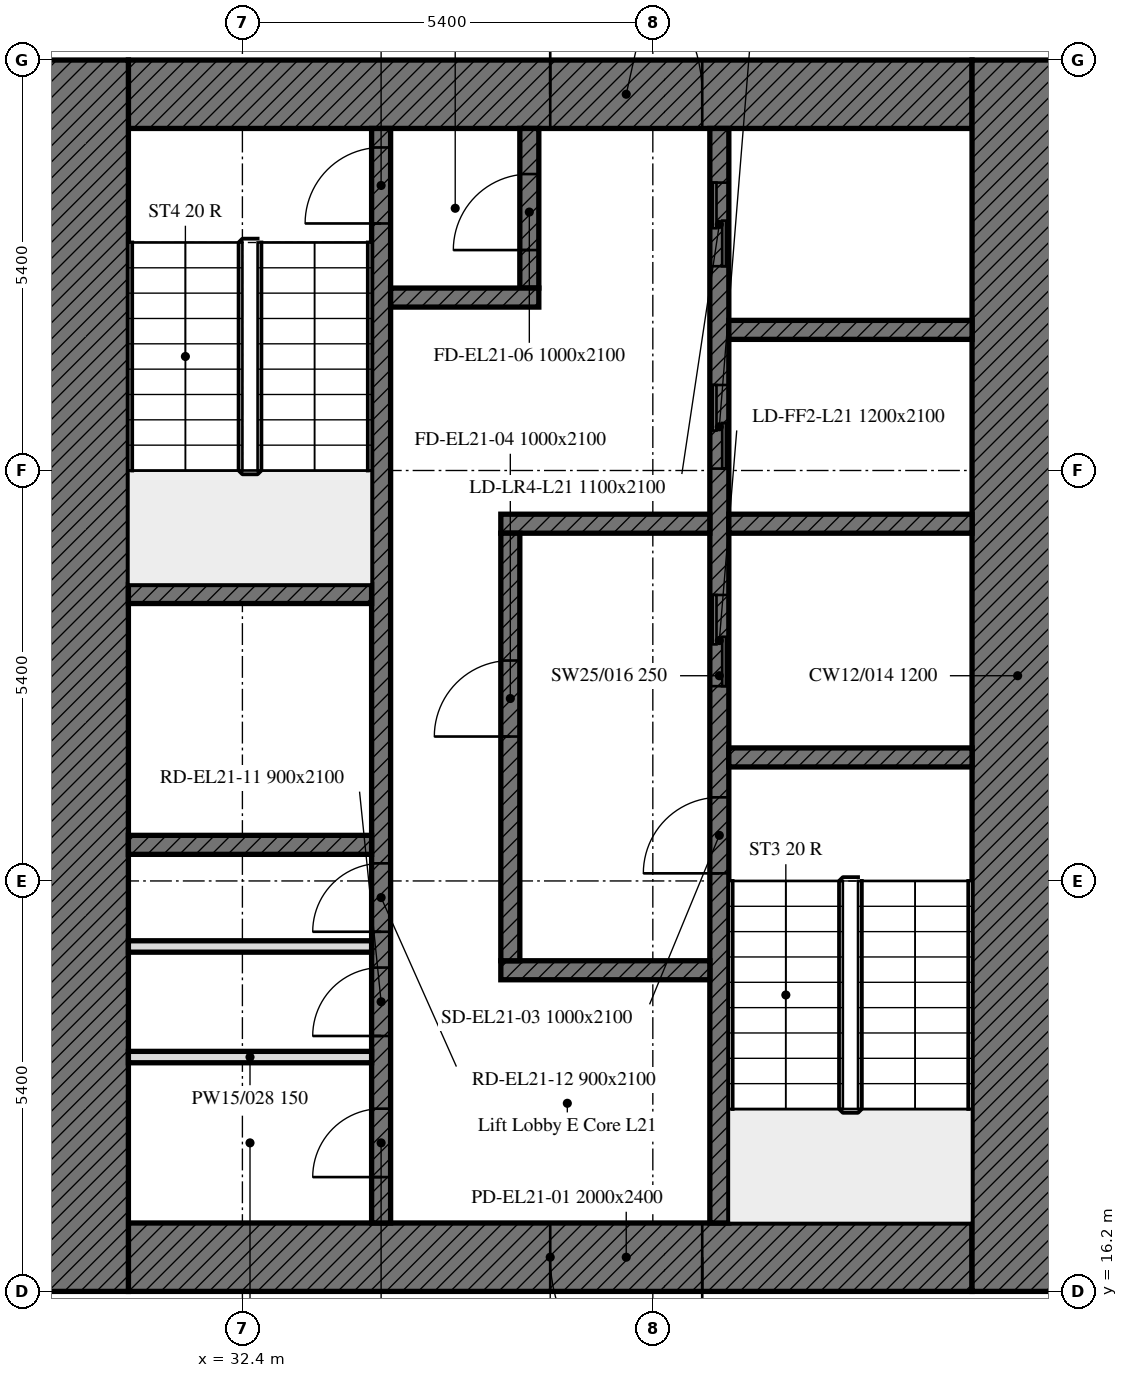
"""IFC4 building model, lengths in metres.
Left out: names, types, materials, properties, quantities, classifications, styles, units other than length and angle.
Written with IfcOpenShell. Run it as: python <this file> out.ifc"""

import sys

from ifc_helpers import new_model, si_unit, direction, frame, frame_2d, origin, place, context, subcontext, project, spatial, rectangle, extrude, element, fill, save


model = new_model("IFC4")
c1 = context("Model", 3, precision=1e-05, world=origin(), true_north=direction((0.0, 1.0)))
c2 = subcontext(c1, "Body", "Model", "MODEL_VIEW")
j1 = project(units=[si_unit("LENGTHUNIT", "METRE"), si_unit("PLANEANGLEUNIT", "RADIAN")], contexts=[c1])
p1 = place(None, origin())
s1 = spatial("IfcSite", under=j1, at=p1, CompositionType="ELEMENT")
p2 = place(p1, origin())
s2 = spatial("IfcBuilding", under=s1, at=p2, CompositionType="ELEMENT")
p3 = place(p2, frame((0.0, 0.0, 91.6)))
s3 = spatial("IfcBuildingStorey", under=s2, at=p3, CompositionType="ELEMENT", Elevation=91.6)
p4 = place(p3, frame((42.0, 16.65, 0.0), z_axis=(0.0, 0.0, 1.0), x_axis=(-1.0, 0.0, 0.0)))
e1 = element("IfcWall", 1, at=p4, inside=s3, PredefinedType="SOLIDWALL", context=c2, shape_type="SweptSolid", body=[
    extrude(rectangle(XDim=11.1, YDim=0.9, at=frame_2d((5.55, 0.0))), origin(), (0.0, 0.0, 1.0), 3.5),
])
p5 = place(p4, frame((3.55, 0.0, 0.0)))
e2 = element("IfcOpeningElement", 2, at=p5, cuts=e1, PredefinedType="OPENING", context=c2, shape_type="SweptSolid", body=[
    extrude(rectangle(XDim=2.0, YDim=2.4, at=frame_2d((1.0, 1.2))), frame((0.0, 0.45, 0.0), z_axis=(0.0, -1.0, 0.0), x_axis=(1.0, 0.0, 0.0)), (0.0, 0.0, 1.0), 0.9),
])
p6 = place(p3, frame((30.9, 31.95, 0.0), z_axis=(0.0, 0.0, 1.0), x_axis=(1.0, 0.0, 0.0)))
e3 = element("IfcWall", 3, at=p6, inside=s3, PredefinedType="SOLIDWALL", context=c2, shape_type="SweptSolid", body=[
    extrude(rectangle(XDim=11.1, YDim=0.9, at=frame_2d((5.55, 0.0))), origin(), (0.0, 0.0, 1.0), 3.5),
])
p7 = place(p6, frame((5.55, 0.0, 0.0)))
e4 = element("IfcOpeningElement", 4, at=p7, cuts=e3, PredefinedType="OPENING", context=c2, shape_type="SweptSolid", body=[
    extrude(rectangle(XDim=2.0, YDim=2.4, at=frame_2d((1.0, 1.2))), frame((0.0, 0.45, 0.0), z_axis=(0.0, -1.0, 0.0), x_axis=(1.0, 0.0, 0.0)), (0.0, 0.0, 1.0), 0.9),
])
for number, where, z_axis, x_axis in (
    (5, (42.6, 32.4, 0.0), (0.0, 0.0, 1.0), (0.0, -1.0, 0.0)),
    (6, (30.3, 16.2, 0.0), (0.0, 0.0, 1.0), (0.0, 1.0, 0.0)),
):
    element("IfcWall", number, at=place(p3, frame(where, z_axis=z_axis, x_axis=x_axis)), inside=s3, PredefinedType="SOLIDWALL", context=c2, shape_type="SweptSolid", body=[
        extrude(rectangle(XDim=16.2, YDim=1.2, at=frame_2d((8.1, 0.0))), origin(), (0.0, 0.0, 1.0), 3.5),
    ])
p8 = place(p3, frame((38.675, 17.1, 0.0), z_axis=(0.0, 0.0, 1.0), x_axis=(0.0, 1.0, 0.0)))
e7 = element("IfcWall", 7, at=p8, inside=s3, PredefinedType="SOLIDWALL", context=c2, shape_type="SweptSolid", body=[
    extrude(rectangle(XDim=14.4, YDim=0.25, at=frame_2d((7.2, 0.0))), origin(), (0.0, 0.0, 1.0), 3.5),
])
p9 = place(p8, frame((4.6, 0.0, 0.0)))
e8 = element("IfcOpeningElement", 8, at=p9, cuts=e7, PredefinedType="OPENING", context=c2, shape_type="SweptSolid", body=[
    extrude(rectangle(XDim=1.0, YDim=2.1, at=frame_2d((0.5, 1.05))), frame((0.0, 0.125, 0.0), z_axis=(0.0, -1.0, 0.0), x_axis=(1.0, 0.0, 0.0)), (0.0, 0.0, 1.0), 0.25),
])
p10 = place(p8, frame((7.062, 0.0, 0.0)))
e9 = element("IfcOpeningElement", 9, at=p10, cuts=e7, PredefinedType="OPENING", context=c2, shape_type="SweptSolid", body=[
    extrude(rectangle(XDim=1.2, YDim=2.1, at=frame_2d((0.6, 1.05))), frame((0.0, 0.125, 0.0), z_axis=(0.0, -1.0, 0.0), x_axis=(1.0, 0.0, 0.0)), (0.0, 0.0, 1.0), 0.25),
])
p11 = place(p8, frame((9.925, 0.0, 0.0)))
e10 = element("IfcOpeningElement", 10, at=p11, cuts=e7, PredefinedType="OPENING", context=c2, shape_type="SweptSolid", body=[
    extrude(rectangle(XDim=1.1, YDim=2.1, at=frame_2d((0.55, 1.05))), frame((0.0, 0.125, 0.0), z_axis=(0.0, -1.0, 0.0), x_axis=(1.0, 0.0, 0.0)), (0.0, 0.0, 1.0), 0.25),
])
p12 = place(p8, frame((12.587, 0.0, 0.0)))
e11 = element("IfcOpeningElement", 11, at=p12, cuts=e7, PredefinedType="OPENING", context=c2, shape_type="SweptSolid", body=[
    extrude(rectangle(XDim=1.1, YDim=2.1, at=frame_2d((0.55, 1.05))), frame((0.0, 0.125, 0.0), z_axis=(0.0, -1.0, 0.0), x_axis=(1.0, 0.0, 0.0)), (0.0, 0.0, 1.0), 0.25),
])
p13 = place(p3, frame((34.225, 17.1, 0.0), z_axis=(0.0, 0.0, 1.0), x_axis=(0.0, 1.0, 0.0)))
e12 = element("IfcWall", 12, at=p13, inside=s3, PredefinedType="SOLIDWALL", context=c2, shape_type="SweptSolid", body=[
    extrude(rectangle(XDim=14.4, YDim=0.25, at=frame_2d((7.2, 0.0))), origin(), (0.0, 0.0, 1.0), 3.5),
])
p14 = place(p13, frame((13.15, 0.0, 0.0)))
e13 = element("IfcOpeningElement", 13, at=p14, cuts=e12, PredefinedType="OPENING", context=c2, shape_type="SweptSolid", body=[
    extrude(rectangle(XDim=1.0, YDim=2.1, at=frame_2d((0.5, 1.05))), frame((0.0, 0.125, 0.0), z_axis=(0.0, -1.0, 0.0), x_axis=(1.0, 0.0, 0.0)), (0.0, 0.0, 1.0), 0.25),
])
p15 = place(p13, frame((0.604, 0.0, 0.0)))
e14 = element("IfcOpeningElement", 14, at=p15, cuts=e12, PredefinedType="OPENING", context=c2, shape_type="SweptSolid", body=[
    extrude(rectangle(XDim=0.9, YDim=2.1, at=frame_2d((0.45, 1.05))), frame((0.0, 0.125, 0.0), z_axis=(0.0, -1.0, 0.0), x_axis=(1.0, 0.0, 0.0)), (0.0, 0.0, 1.0), 0.25),
])
p16 = place(p13, frame((2.46, 0.0, 0.0)))
e15 = element("IfcOpeningElement", 15, at=p16, cuts=e12, PredefinedType="OPENING", context=c2, shape_type="SweptSolid", body=[
    extrude(rectangle(XDim=0.9, YDim=2.1, at=frame_2d((0.45, 1.05))), frame((0.0, 0.125, 0.0), z_axis=(0.0, -1.0, 0.0), x_axis=(1.0, 0.0, 0.0)), (0.0, 0.0, 1.0), 0.25),
])
p17 = place(p13, frame((3.832, 0.0, 0.0)))
e16 = element("IfcOpeningElement", 16, at=p17, cuts=e12, PredefinedType="OPENING", context=c2, shape_type="SweptSolid", body=[
    extrude(rectangle(XDim=0.9, YDim=2.1, at=frame_2d((0.45, 1.05))), frame((0.0, 0.125, 0.0), z_axis=(0.0, -1.0, 0.0), x_axis=(1.0, 0.0, 0.0)), (0.0, 0.0, 1.0), 0.25),
])
p18 = place(p3, frame((38.8, 23.225, 0.0), z_axis=(0.0, 0.0, 1.0), x_axis=(1.0, 0.0, 0.0)))
e17 = element("IfcWall", 17, at=p18, inside=s3, PredefinedType="SOLIDWALL", context=c2, shape_type="SweptSolid", body=[
    extrude(rectangle(XDim=3.2, YDim=0.25, at=frame_2d((1.6, 0.0))), origin(), (0.0, 0.0, 1.0), 3.5),
])
for number, where, z_axis, x_axis in (
    (18, (30.9, 25.375, 0.0), (0.0, 0.0, 1.0), (1.0, 0.0, 0.0)),
    (19, (30.9, 22.075, 0.0), (0.0, 0.0, 1.0), (1.0, 0.0, 0.0)),
):
    element("IfcWall", number, at=place(p3, frame(where, z_axis=z_axis, x_axis=x_axis)), inside=s3, PredefinedType="SOLIDWALL", context=c2, shape_type="SweptSolid", body=[
        extrude(rectangle(XDim=3.2, YDim=0.25, at=frame_2d((1.6, 0.0))), origin(), (0.0, 0.0, 1.0), 3.5),
    ])
p19 = place(p3, frame((38.8, 26.3, 0.0), z_axis=(0.0, 0.0, 1.0), x_axis=(1.0, 0.0, 0.0)))
e20 = element("IfcWall", 20, at=p19, inside=s3, PredefinedType="SOLIDWALL", context=c2, shape_type="SweptSolid", body=[
    extrude(rectangle(XDim=3.2, YDim=0.25, at=frame_2d((1.6, 0.0))), origin(), (0.0, 0.0, 1.0), 3.5),
])
for number, where, z_axis, x_axis in (
    (21, (35.8, 26.3, 0.0), (0.0, 0.0, 1.0), (1.0, 0.0, 0.0)),
    (22, (35.8, 20.425, 0.0), (0.0, 0.0, 1.0), (1.0, 0.0, 0.0)),
):
    element("IfcWall", number, at=place(p3, frame(where, z_axis=z_axis, x_axis=x_axis)), inside=s3, PredefinedType="SOLIDWALL", context=c2, shape_type="SweptSolid", body=[
        extrude(rectangle(XDim=2.75, YDim=0.25, at=frame_2d((1.375, 0.0))), origin(), (0.0, 0.0, 1.0), 3.5),
    ])
p20 = place(p3, frame((36.175, 29.4, 0.0), z_axis=(0.0, 0.0, 1.0), x_axis=(0.0, 1.0, 0.0)))
e23 = element("IfcWall", 23, at=p20, inside=s3, PredefinedType="SOLIDWALL", context=c2, shape_type="SweptSolid", body=[
    extrude(rectangle(XDim=2.1, YDim=0.25, at=frame_2d((1.05, 0.0))), origin(), (0.0, 0.0, 1.0), 3.5),
])
p21 = place(p20, frame((0.5, 0.0, 0.0)))
e24 = element("IfcOpeningElement", 24, at=p21, cuts=e23, PredefinedType="OPENING", context=c2, shape_type="SweptSolid", body=[
    extrude(rectangle(XDim=1.0, YDim=2.1, at=frame_2d((0.5, 1.05))), frame((0.0, 0.125, 0.0), z_axis=(0.0, -1.0, 0.0), x_axis=(1.0, 0.0, 0.0)), (0.0, 0.0, 1.0), 0.25),
])
p22 = place(p3, frame((34.35, 29.275, 0.0), z_axis=(0.0, 0.0, 1.0), x_axis=(1.0, 0.0, 0.0)))
e25 = element("IfcWall", 25, at=p22, inside=s3, PredefinedType="SOLIDWALL", context=c2, shape_type="SweptSolid", body=[
    extrude(rectangle(XDim=1.95, YDim=0.25, at=frame_2d((0.975, 0.0))), origin(), (0.0, 0.0, 1.0), 3.5),
])
p23 = place(p3, frame((35.925, 20.55, 0.0), z_axis=(0.0, 0.0, 1.0), x_axis=(0.0, 1.0, 0.0)))
e26 = element("IfcWall", 26, at=p23, inside=s3, PredefinedType="SOLIDWALL", context=c2, shape_type="SweptSolid", body=[
    extrude(rectangle(XDim=5.625, YDim=0.25, at=frame_2d((2.812, 0.0))), origin(), (0.0, 0.0, 1.0), 3.5),
])
p24 = place(p23, frame((2.95, 0.0, 0.0)))
e27 = element("IfcOpeningElement", 27, at=p24, cuts=e26, PredefinedType="OPENING", context=c2, shape_type="SweptSolid", body=[
    extrude(rectangle(XDim=1.0, YDim=2.1, at=frame_2d((0.5, 1.05))), frame((0.0, 0.125, 0.0), z_axis=(0.0, -1.0, 0.0), x_axis=(1.0, 0.0, 0.0)), (0.0, 0.0, 1.0), 0.25),
])
p25 = place(p3, frame((38.8, 28.85, 0.0), z_axis=(0.0, 0.0, 1.0), x_axis=(1.0, 0.0, 0.0)))
e28 = element("IfcWall", 28, at=p25, inside=s3, PredefinedType="SOLIDWALL", context=c2, shape_type="SweptSolid", body=[
    extrude(rectangle(XDim=3.2, YDim=0.25, at=frame_2d((1.6, 0.0))), origin(), (0.0, 0.0, 1.0), 3.5),
])
for number, where, z_axis, x_axis in (
    (29, (30.9, 19.283, 0.0), (0.0, 0.0, 1.0), (1.0, 0.0, 0.0)),
    (30, (30.9, 20.738, 0.0), (0.0, 0.0, 1.0), (1.0, 0.0, 0.0)),
):
    element("IfcWall", number, at=place(p3, frame(where, z_axis=z_axis, x_axis=x_axis)), inside=s3, PredefinedType="PARTITIONING", context=c2, shape_type="SweptSolid", body=[
        extrude(rectangle(XDim=3.2, YDim=0.15, at=frame_2d((1.6, 0.0))), origin(), (0.0, 0.0, 1.0), 3.5),
    ])
p26 = place(p5, origin())
e31 = element("IfcDoor", 31, at=p26, inside=s3, OperationType="DOUBLE_DOOR_SINGLE_SWING", PredefinedType="DOOR", context=c2, shape_type="SweptSolid", body=[
    extrude(rectangle(XDim=2.0, YDim=2.4, at=frame_2d((1.0, 1.2))), frame((0.0, 0.025, 0.0), z_axis=(0.0, -1.0, 0.0), x_axis=(1.0, 0.0, 0.0)), (0.0, 0.0, 1.0), 0.05),
])
fill(e2, e31)
p27 = place(p7, origin())
e32 = element("IfcDoor", 32, at=p27, inside=s3, OperationType="DOUBLE_DOOR_SINGLE_SWING", PredefinedType="DOOR", context=c2, shape_type="SweptSolid", body=[
    extrude(rectangle(XDim=2.0, YDim=2.4, at=frame_2d((1.0, 1.2))), frame((0.0, 0.025, 0.0), z_axis=(0.0, -1.0, 0.0), x_axis=(1.0, 0.0, 0.0)), (0.0, 0.0, 1.0), 0.05),
])
fill(e4, e32)
p28 = place(p9, origin())
e33 = element("IfcDoor", 33, at=p28, inside=s3, OperationType="SINGLE_SWING_LEFT", PredefinedType="DOOR", context=c2, shape_type="SweptSolid", body=[
    extrude(rectangle(XDim=1.0, YDim=2.1, at=frame_2d((0.5, 1.05))), frame((0.0, 0.025, 0.0), z_axis=(0.0, -1.0, 0.0), x_axis=(1.0, 0.0, 0.0)), (0.0, 0.0, 1.0), 0.05),
])
fill(e8, e33)
p29 = place(p24, origin())
e34 = element("IfcDoor", 34, at=p29, inside=s3, OperationType="SINGLE_SWING_LEFT", PredefinedType="DOOR", context=c2, shape_type="SweptSolid", body=[
    extrude(rectangle(XDim=1.0, YDim=2.1, at=frame_2d((0.5, 1.05))), frame((0.0, 0.025, 0.0), z_axis=(0.0, -1.0, 0.0), x_axis=(1.0, 0.0, 0.0)), (0.0, 0.0, 1.0), 0.05),
])
fill(e27, e34)
p30 = place(p14, origin())
e35 = element("IfcDoor", 35, at=p30, inside=s3, OperationType="SINGLE_SWING_LEFT", PredefinedType="DOOR", context=c2, shape_type="SweptSolid", body=[
    extrude(rectangle(XDim=1.0, YDim=2.1, at=frame_2d((0.5, 1.05))), frame((0.0, 0.025, 0.0), z_axis=(0.0, -1.0, 0.0), x_axis=(1.0, 0.0, 0.0)), (0.0, 0.0, 1.0), 0.05),
])
fill(e13, e35)
p31 = place(p21, origin())
e36 = element("IfcDoor", 36, at=p31, inside=s3, OperationType="SINGLE_SWING_LEFT", PredefinedType="DOOR", context=c2, shape_type="SweptSolid", body=[
    extrude(rectangle(XDim=1.0, YDim=2.1, at=frame_2d((0.5, 1.05))), frame((0.0, 0.025, 0.0), z_axis=(0.0, -1.0, 0.0), x_axis=(1.0, 0.0, 0.0)), (0.0, 0.0, 1.0), 0.05),
])
fill(e24, e36)
p32 = place(p10, origin())
e37 = element("IfcDoor", 37, at=p32, inside=s3, OperationType="DOUBLE_DOOR_SLIDING", PredefinedType="DOOR", context=c2, shape_type="SweptSolid", body=[
    extrude(rectangle(XDim=1.2, YDim=2.1, at=frame_2d((0.6, 1.05))), frame((0.0, 0.025, 0.0), z_axis=(0.0, -1.0, 0.0), x_axis=(1.0, 0.0, 0.0)), (0.0, 0.0, 1.0), 0.05),
])
fill(e9, e37)
p33 = place(p11, origin())
e38 = element("IfcDoor", 38, at=p33, inside=s3, OperationType="DOUBLE_DOOR_SLIDING", PredefinedType="DOOR", context=c2, shape_type="SweptSolid", body=[
    extrude(rectangle(XDim=1.1, YDim=2.1, at=frame_2d((0.55, 1.05))), frame((0.0, 0.025, 0.0), z_axis=(0.0, -1.0, 0.0), x_axis=(1.0, 0.0, 0.0)), (0.0, 0.0, 1.0), 0.05),
])
fill(e10, e38)
p34 = place(p12, origin())
e39 = element("IfcDoor", 39, at=p34, inside=s3, OperationType="DOUBLE_DOOR_SLIDING", PredefinedType="DOOR", context=c2, shape_type="SweptSolid", body=[
    extrude(rectangle(XDim=1.1, YDim=2.1, at=frame_2d((0.55, 1.05))), frame((0.0, 0.025, 0.0), z_axis=(0.0, -1.0, 0.0), x_axis=(1.0, 0.0, 0.0)), (0.0, 0.0, 1.0), 0.05),
])
fill(e11, e39)
p35 = place(p15, origin())
e40 = element("IfcDoor", 40, at=p35, inside=s3, OperationType="SINGLE_SWING_LEFT", PredefinedType="DOOR", context=c2, shape_type="SweptSolid", body=[
    extrude(rectangle(XDim=0.9, YDim=2.1, at=frame_2d((0.45, 1.05))), frame((0.0, 0.025, 0.0), z_axis=(0.0, -1.0, 0.0), x_axis=(1.0, 0.0, 0.0)), (0.0, 0.0, 1.0), 0.05),
])
fill(e14, e40)
p36 = place(p16, origin())
e41 = element("IfcDoor", 41, at=p36, inside=s3, OperationType="SINGLE_SWING_LEFT", PredefinedType="DOOR", context=c2, shape_type="SweptSolid", body=[
    extrude(rectangle(XDim=0.9, YDim=2.1, at=frame_2d((0.45, 1.05))), frame((0.0, 0.025, 0.0), z_axis=(0.0, -1.0, 0.0), x_axis=(1.0, 0.0, 0.0)), (0.0, 0.0, 1.0), 0.05),
])
fill(e15, e41)
p37 = place(p17, origin())
e42 = element("IfcDoor", 42, at=p37, inside=s3, OperationType="SINGLE_SWING_LEFT", PredefinedType="DOOR", context=c2, shape_type="SweptSolid", body=[
    extrude(rectangle(XDim=0.9, YDim=2.1, at=frame_2d((0.45, 1.05))), frame((0.0, 0.025, 0.0), z_axis=(0.0, -1.0, 0.0), x_axis=(1.0, 0.0, 0.0)), (0.0, 0.0, 1.0), 0.05),
])
fill(e16, e42)
save(model, sys.argv[1])
